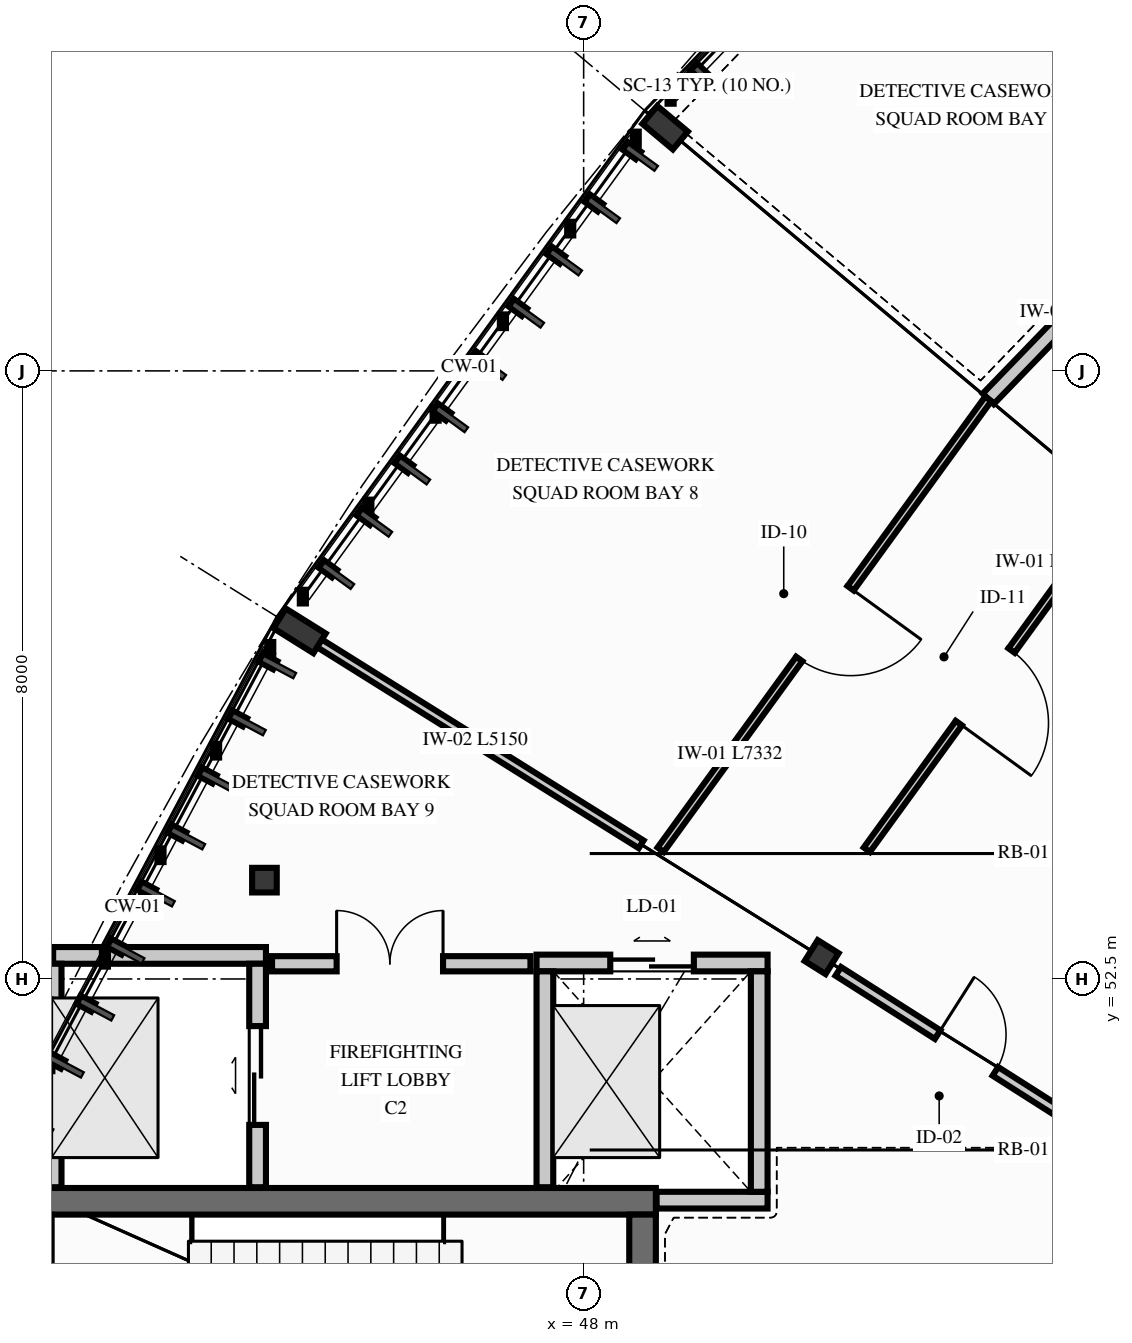
"""IFC4 building model, lengths in metres.
Left out: names, types, materials, properties, quantities, classifications, styles, units other than length and angle.
Written with IfcOpenShell. Run it as: python <this file> out.ifc"""

import sys

from ifc_helpers import new_model, si_unit, direction, frame, frame_2d, origin, origin_2d, place, context, subcontext, project, spatial, rectangle, hollow_circle, i_section, extrude, element, fill, save


model = new_model("IFC4")
c1 = context("Model", 3, precision=1e-05, world=origin(), true_north=direction((0.0, 1.0)))
c2 = subcontext(c1, "Body", "Model", "MODEL_VIEW")
j1 = project(units=[si_unit("LENGTHUNIT", "METRE"), si_unit("PLANEANGLEUNIT", "RADIAN")], contexts=[c1])
p1 = place(None, origin())
s1 = spatial("IfcSite", under=j1, at=p1, CompositionType="ELEMENT")
p2 = place(p1, origin())
s2 = spatial("IfcBuilding", under=s1, at=p2, CompositionType="ELEMENT")
p3 = place(p2, frame((0.0, 0.0, 5.1)))
s3 = spatial("IfcBuildingStorey", under=s2, at=p3, CompositionType="ELEMENT", Elevation=5.1)
p4 = place(p3, frame((40.65, 49.575, 0.0), z_axis=(0.0, 0.0, 1.0), x_axis=(1.0, 0.0, 0.0)))
e1 = element("IfcWall", 1, at=p4, inside=s3, PredefinedType="SHEAR", context=c2, shape_type="SweptSolid", body=[
    extrude(rectangle(XDim=8.3, YDim=0.35, at=frame_2d((4.15, 0.0))), origin(), (0.0, 0.0, 1.0), 3.98),
])
p5 = place(p3, frame((48.775, 42.6, 0.0), z_axis=(0.0, 0.0, 1.0), x_axis=(0.0, 1.0, 0.0)))
e2 = element("IfcWall", 2, at=p5, inside=s3, PredefinedType="SHEAR", context=c2, shape_type="SweptSolid", body=[
    extrude(rectangle(XDim=6.8, YDim=0.35, at=frame_2d((3.4, 0.0))), origin(), (0.0, 0.0, 1.0), 3.98),
])
p6 = place(p3, frame((49.072, 63.699, 0.0), z_axis=(0.0, 0.0, 1.0), x_axis=(0.642787609687, 0.766044443119, 0.0)))
e3 = element("IfcColumn", 3, at=p6, inside=s3, PredefinedType="COLUMN", context=c2, shape_type="SweptSolid", body=[
    extrude(i_section(OverallWidth=0.306, OverallDepth=0.524, WebThickness=0.021, FlangeThickness=0.04, FilletRadius=0.027, at=origin_2d()), origin(), (0.0, 0.0, 1.0), 4.2),
])
p7 = place(p3, frame((51.131, 52.787, 0.0), z_axis=(0.0, 0.0, 1.0), x_axis=(0.529919264233, 0.848048096156, 0.0)))
e4 = element("IfcColumn", 4, at=p7, inside=s3, PredefinedType="COLUMN", context=c2, shape_type="SweptSolid", body=[
    extrude(hollow_circle(Radius=0.162, WallThickness=0.016, at=origin_2d()), origin(), (0.0, 0.0, 1.0), 4.2),
])
p8 = place(p3, frame((44.262, 57.08, 0.0), z_axis=(0.0, 0.0, 1.0), x_axis=(0.529919264233, 0.848048096156, 0.0)))
e5 = element("IfcColumn", 5, at=p8, inside=s3, PredefinedType="COLUMN", context=c2, shape_type="SweptSolid", body=[
    extrude(i_section(OverallWidth=0.305, OverallDepth=0.62, WebThickness=0.021, FlangeThickness=0.04, FilletRadius=0.027, at=origin_2d()), origin(), (0.0, 0.0, 1.0), 4.2),
])
p9 = place(p3, frame((43.8, 53.8, 0.0), z_axis=(0.0, 0.0, 1.0), x_axis=(1.0, 0.0, 0.0)))
e6 = element("IfcColumn", 6, at=p9, inside=s3, PredefinedType="COLUMN", context=c2, shape_type="SweptSolid", body=[
    extrude(hollow_circle(Radius=0.162, WallThickness=0.016, at=origin_2d()), origin(), (0.0, 0.0, 1.0), 4.2),
])
p10 = place(p3, frame((41.02, 52.81, 0.0), z_axis=(0.0, 0.0, 1.0), x_axis=(1.0, 0.0, 0.0)))
e7 = element("IfcWall", 7, at=p10, inside=s3, PredefinedType="PARTITIONING", context=c2, shape_type="SweptSolid", body=[
    extrude(rectangle(XDim=2.8, YDim=0.22, at=frame_2d((1.4, 0.0))), origin(), (0.0, 0.0, 1.0), 3.92),
])
p11 = place(p3, frame((41.02, 49.76, 0.0), z_axis=(0.0, 0.0, 1.0), x_axis=(0.0, 1.0, 0.0)))
e8 = element("IfcWall", 8, at=p11, inside=s3, PredefinedType="PARTITIONING", context=c2, shape_type="SweptSolid", body=[
    extrude(rectangle(XDim=2.94, YDim=0.22, at=frame_2d((1.47, 0.0))), origin(), (0.0, 0.0, 1.0), 3.92),
])
p12 = place(p3, frame((43.71, 49.76, 0.0), z_axis=(0.0, 0.0, 1.0), x_axis=(0.0, 1.0, 0.0)))
e9 = element("IfcWall", 9, at=p12, inside=s3, PredefinedType="PARTITIONING", context=c2, shape_type="SweptSolid", body=[
    extrude(rectangle(XDim=2.94, YDim=0.22, at=frame_2d((1.47, 0.0))), origin(), (0.0, 0.0, 1.0), 3.92),
])
p13 = place(p12, frame((0.82, 0.0, 0.0)))
e10 = element("IfcOpeningElement", 10, at=p13, cuts=e9, PredefinedType="OPENING", context=c2, shape_type="SweptSolid", body=[
    extrude(rectangle(XDim=1.3, YDim=2.2, at=frame_2d((0.65, 1.1))), frame((0.0, 0.12, 0.0), z_axis=(0.0, -1.0, 0.0), x_axis=(1.0, 0.0, 0.0)), (0.0, 0.0, 1.0), 0.24),
])
p14 = place(p3, frame((48.96, 49.59, 0.0), z_axis=(0.0, 0.0, 1.0), x_axis=(1.0, 0.0, 0.0)))
e11 = element("IfcWall", 11, at=p14, inside=s3, PredefinedType="PARTITIONING", context=c2, shape_type="SweptSolid", body=[
    extrude(rectangle(XDim=1.46, YDim=0.22, at=frame_2d((0.73, 0.0))), origin(), (0.0, 0.0, 1.0), 3.92),
])
p15 = place(p3, frame((47.38, 52.71, 0.0), z_axis=(0.0, 0.0, 1.0), x_axis=(1.0, 0.0, 0.0)))
e12 = element("IfcWall", 12, at=p15, inside=s3, PredefinedType="PARTITIONING", context=c2, shape_type="SweptSolid", body=[
    extrude(rectangle(XDim=3.04, YDim=0.22, at=frame_2d((1.52, 0.0))), origin(), (0.0, 0.0, 1.0), 3.92),
])
p16 = place(p15, frame((0.97, 0.0, 0.0)))
e13 = element("IfcOpeningElement", 13, at=p16, cuts=e12, PredefinedType="OPENING", context=c2, shape_type="SweptSolid", body=[
    extrude(rectangle(XDim=1.1, YDim=2.15, at=frame_2d((0.55, 1.075))), frame((0.0, 0.12, 0.0), z_axis=(0.0, -1.0, 0.0), x_axis=(1.0, 0.0, 0.0)), (0.0, 0.0, 1.0), 0.24),
])
p17 = place(p3, frame((47.49, 49.76, 0.0), z_axis=(0.0, 0.0, 1.0), x_axis=(0.0, 1.0, 0.0)))
e14 = element("IfcWall", 14, at=p17, inside=s3, PredefinedType="PARTITIONING", context=c2, shape_type="SweptSolid", body=[
    extrude(rectangle(XDim=2.84, YDim=0.22, at=frame_2d((1.42, 0.0))), origin(), (0.0, 0.0, 1.0), 3.92),
])
p18 = place(p3, frame((50.31, 49.7, 0.0), z_axis=(0.0, 0.0, 1.0), x_axis=(0.0, 1.0, 0.0)))
e15 = element("IfcWall", 15, at=p18, inside=s3, PredefinedType="PARTITIONING", context=c2, shape_type="SweptSolid", body=[
    extrude(rectangle(XDim=2.9, YDim=0.22, at=frame_2d((1.45, 0.0))), origin(), (0.0, 0.0, 1.0), 3.92),
])
p19 = place(p3, frame((43.9, 52.7, 0.0), z_axis=(0.0, 0.0, 1.0), x_axis=(1.0, 0.0, 0.0)))
e16 = element("IfcWall", 16, at=p19, inside=s3, PredefinedType="PARTITIONING", context=c2, shape_type="SweptSolid", body=[
    extrude(rectangle(XDim=3.4, YDim=0.2, at=frame_2d((1.7, 0.0))), origin(), (0.0, 0.0, 1.0), 3.92),
])
p20 = place(p19, frame((0.85, 0.0, 0.0)))
e17 = element("IfcOpeningElement", 17, at=p20, cuts=e16, PredefinedType="OPENING", context=c2, shape_type="SweptSolid", body=[
    extrude(rectangle(XDim=1.4, YDim=2.25, at=frame_2d((0.7, 1.125))), frame((0.0, 0.11, 0.0), z_axis=(0.0, -1.0, 0.0), x_axis=(1.0, 0.0, 0.0)), (0.0, 0.0, 1.0), 0.22),
])
p21 = place(p3, frame((51.35, 52.6, 0.0), z_axis=(0.0, 0.0, 1.0), x_axis=(0.84363284859, -0.536920493909, 0.0)))
e18 = element("IfcWall", 18, at=p21, inside=s3, PredefinedType="PARTITIONING", context=c2, shape_type="SweptSolid", body=[
    extrude(rectangle(XDim=4.563, YDim=0.135, at=frame_2d((2.282, 0.0))), origin(), (0.0, 0.0, 1.0), 3.58),
])
p22 = place(p21, frame((1.55, 0.0, 0.0)))
e19 = element("IfcOpeningElement", 19, at=p22, cuts=e18, PredefinedType="OPENING", context=c2, shape_type="SweptSolid", body=[
    extrude(rectangle(XDim=0.9, YDim=2.1, at=frame_2d((0.45, 1.05))), frame((0.0, 0.077, 0.0), z_axis=(0.0, -1.0, 0.0), x_axis=(1.0, 0.0, 0.0)), (0.0, 0.0, 1.0), 0.155),
])
p23 = place(p3, frame((58.469, 65.461, 0.0), z_axis=(0.0, 0.0, 1.0), x_axis=(-0.694673907436, -0.71932479613, 0.0)))
e20 = element("IfcWall", 20, at=p23, inside=s3, PredefinedType="PARTITIONING", context=c2, shape_type="SweptSolid", body=[
    extrude(rectangle(XDim=7.408, YDim=0.2, at=frame_2d((3.704, 0.0))), origin(), (0.0, 0.0, 1.0), 3.92),
])
p24 = place(p23, frame((3.111, 0.0, 0.0)))
e21 = element("IfcOpeningElement", 21, at=p24, cuts=e20, PredefinedType="OPENING", context=c2, shape_type="SweptSolid", body=[
    extrude(rectangle(XDim=1.12, YDim=2.2, at=frame_2d((0.56, 1.1))), frame((0.0, 0.11, 0.0), z_axis=(0.0, -1.0, 0.0), x_axis=(1.0, 0.0, 0.0)), (0.0, 0.0, 1.0), 0.22),
])
p25 = place(p3, frame((55.008, 58.718, 0.0), z_axis=(0.0, 0.0, 1.0), x_axis=(-0.587773920785, -0.809025227076, 0.0)))
e22 = element("IfcWall", 22, at=p25, inside=s3, PredefinedType="PARTITIONING", context=c2, shape_type="SweptSolid", body=[
    extrude(rectangle(XDim=5.584, YDim=0.1, at=frame_2d((2.792, 0.0))), origin(), (0.0, 0.0, 1.0), 3.92),
])
p26 = place(p25, frame((2.345, 0.0, 0.0)))
e23 = element("IfcOpeningElement", 23, at=p26, cuts=e22, PredefinedType="OPENING", context=c2, shape_type="SweptSolid", body=[
    extrude(rectangle(XDim=1.18, YDim=2.24, at=frame_2d((0.59, 1.12))), frame((0.0, 0.06, 0.0), z_axis=(0.0, -1.0, 0.0), x_axis=(1.0, 0.0, 0.0)), (0.0, 0.0, 1.0), 0.12),
])
p27 = place(p3, frame((53.323, 60.132, 0.0), z_axis=(0.0, 0.0, 1.0), x_axis=(-0.587773694682, -0.809025391344, 0.0)))
e24 = element("IfcWall", 24, at=p27, inside=s3, PredefinedType="PARTITIONING", context=c2, shape_type="SweptSolid", body=[
    extrude(rectangle(XDim=7.333, YDim=0.1, at=frame_2d((3.666, 0.0))), origin(), (0.0, 0.0, 1.0), 3.92),
])
p28 = place(p27, frame((3.08, 0.0, 0.0)))
e25 = element("IfcOpeningElement", 25, at=p28, cuts=e24, PredefinedType="OPENING", context=c2, shape_type="SweptSolid", body=[
    extrude(rectangle(XDim=1.15, YDim=2.2, at=frame_2d((0.575, 1.1))), frame((0.0, 0.06, 0.0), z_axis=(0.0, -1.0, 0.0), x_axis=(1.0, 0.0, 0.0)), (0.0, 0.0, 1.0), 0.12),
])
p29 = place(p3, frame((48.757, 54.271, 0.0), z_axis=(0.0, 0.0, 1.0), x_axis=(-0.848054228257, 0.529909450694, 0.0)))
e26 = element("IfcWall", 26, at=p29, inside=s3, PredefinedType="PARTITIONING", context=c2, shape_type="SweptSolid", body=[
    extrude(rectangle(XDim=5.15, YDim=0.12, at=frame_2d((2.575, 0.0))), origin(), (0.0, 0.0, 1.0), 3.53),
])
p30 = place(p13, origin())
e27 = element("IfcDoor", 27, at=p30, inside=s3, OperationType="DOUBLE_DOOR_SLIDING", PredefinedType="DOOR", context=c2, shape_type="SweptSolid", body=[
    extrude(rectangle(XDim=1.3, YDim=2.2, at=frame_2d((0.65, 1.1))), frame((0.0, 0.025, 0.0), z_axis=(0.0, -1.0, 0.0), x_axis=(1.0, 0.0, 0.0)), (0.0, 0.0, 1.0), 0.05),
])
fill(e10, e27)
p31 = place(p16, origin())
e28 = element("IfcDoor", 28, at=p31, inside=s3, OperationType="DOUBLE_DOOR_SLIDING", PredefinedType="DOOR", context=c2, shape_type="SweptSolid", body=[
    extrude(rectangle(XDim=1.1, YDim=2.15, at=frame_2d((0.55, 1.075))), frame((0.0, 0.025, 0.0), z_axis=(0.0, -1.0, 0.0), x_axis=(1.0, 0.0, 0.0)), (0.0, 0.0, 1.0), 0.05),
])
fill(e13, e28)
p32 = place(p20, origin())
e29 = element("IfcDoor", 29, at=p32, inside=s3, OperationType="DOUBLE_DOOR_SINGLE_SWING", PredefinedType="DOOR", context=c2, shape_type="SweptSolid", body=[
    extrude(rectangle(XDim=1.4, YDim=2.25, at=frame_2d((0.7, 1.125))), frame((0.0, 0.025, 0.0), z_axis=(0.0, -1.0, 0.0), x_axis=(1.0, 0.0, 0.0)), (0.0, 0.0, 1.0), 0.05),
])
fill(e17, e29)
p33 = place(p22, origin())
e30 = element("IfcDoor", 30, at=p33, inside=s3, OperationType="SINGLE_SWING_LEFT", PredefinedType="DOOR", context=c2, shape_type="SweptSolid", body=[
    extrude(rectangle(XDim=0.9, YDim=2.1, at=frame_2d((0.45, 1.05))), frame((0.0, 0.025, 0.0), z_axis=(0.0, -1.0, 0.0), x_axis=(1.0, 0.0, 0.0)), (0.0, 0.0, 1.0), 0.05),
])
fill(e19, e30)
p34 = place(p26, origin())
e31 = element("IfcDoor", 31, at=p34, inside=s3, OperationType="SINGLE_SWING_RIGHT", PredefinedType="DOOR", context=c2, shape_type="SweptSolid", body=[
    extrude(rectangle(XDim=1.18, YDim=2.24, at=frame_2d((0.59, 1.12))), frame((0.0, 0.025, 0.0), z_axis=(0.0, -1.0, 0.0), x_axis=(1.0, 0.0, 0.0)), (0.0, 0.0, 1.0), 0.05),
])
fill(e23, e31)
p35 = place(p28, origin())
e32 = element("IfcDoor", 32, at=p35, inside=s3, OperationType="SINGLE_SWING_LEFT", PredefinedType="DOOR", context=c2, shape_type="SweptSolid", body=[
    extrude(rectangle(XDim=1.15, YDim=2.2, at=frame_2d((0.575, 1.1))), frame((0.0, 0.025, 0.0), z_axis=(0.0, -1.0, 0.0), x_axis=(1.0, 0.0, 0.0)), (0.0, 0.0, 1.0), 0.05),
])
fill(e25, e32)
save(model, sys.argv[1])
